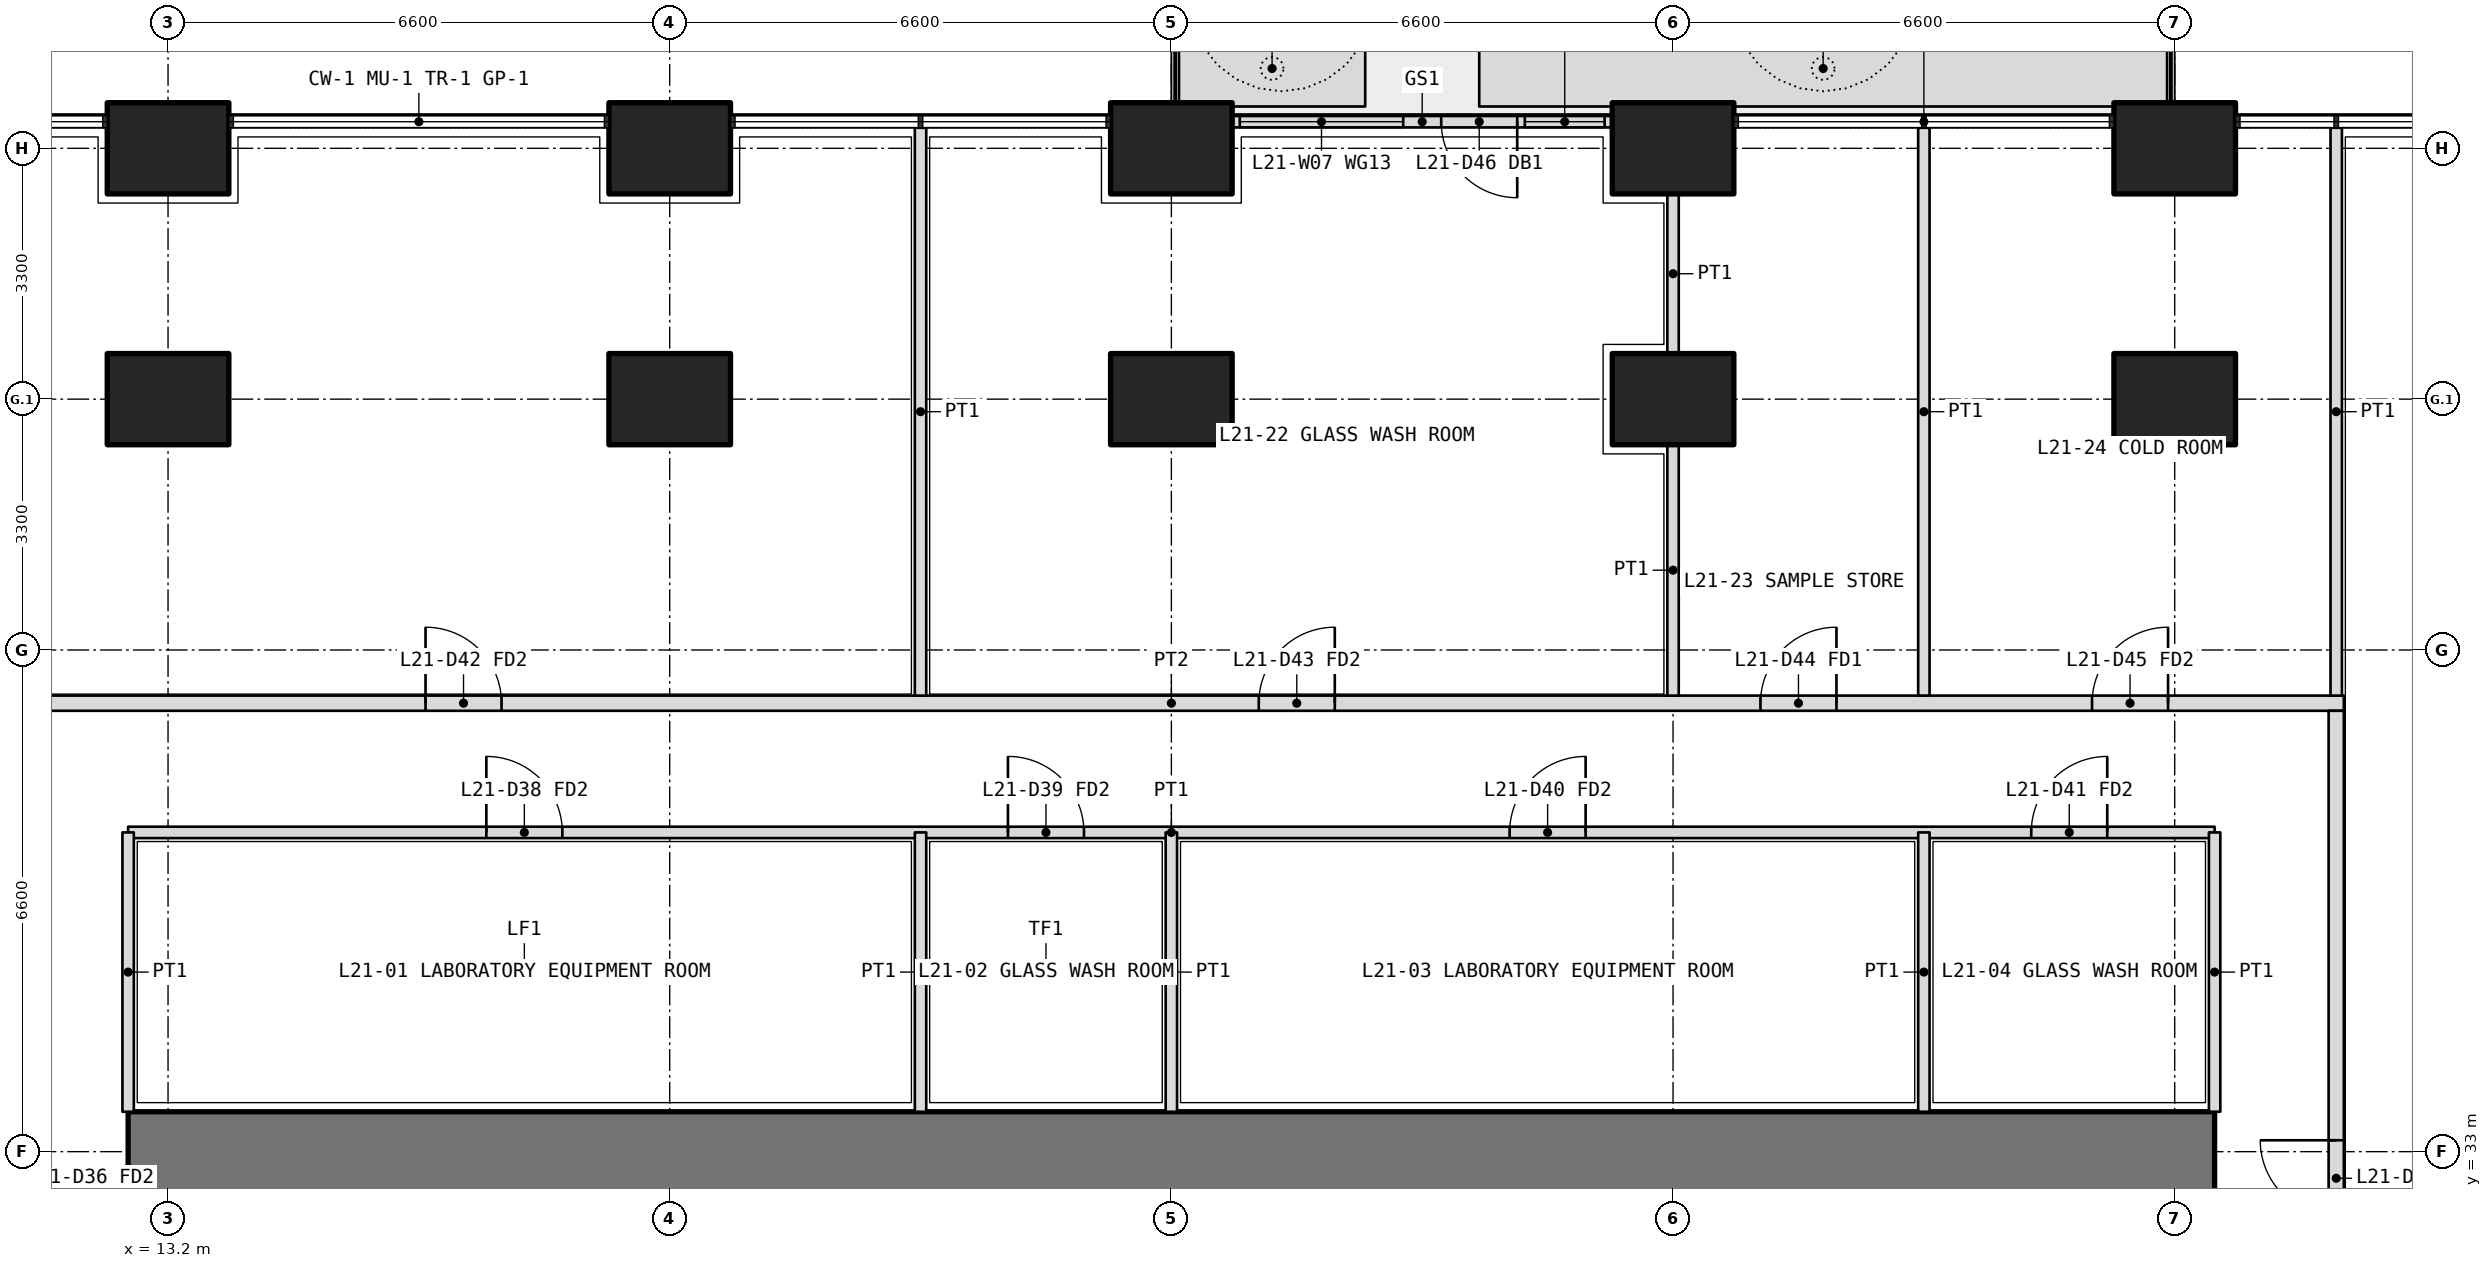
"""IFC4 building model, lengths in metres.
Left out: names, types, materials, properties, quantities, classifications, styles, units other than length and angle.
Written with IfcOpenShell. Run it as: python <this file> out.ifc"""

import sys

from ifc_helpers import new_model, si_unit, direction, frame, frame_2d, origin, origin_2d, place, context, subcontext, project, spatial, polyline, rectangle, outline, extrude, element, fill, save


model = new_model("IFC4")
c1 = context("Model", 3, precision=1e-05, world=origin(), true_north=direction((0.0, 1.0)))
c2 = subcontext(c1, "Body", "Model", "MODEL_VIEW")
j1 = project(units=[si_unit("LENGTHUNIT", "METRE"), si_unit("PLANEANGLEUNIT", "RADIAN")], contexts=[c1])
p1 = place(None, origin())
s1 = spatial("IfcSite", under=j1, at=p1, CompositionType="ELEMENT")
p2 = place(p1, origin())
s2 = spatial("IfcBuilding", under=s1, at=p2, CompositionType="ELEMENT")
p3 = place(p2, frame((0.0, 0.0, 94.8)))
s3 = spatial("IfcBuildingStorey", under=s2, at=p3, CompositionType="ELEMENT", Elevation=94.8)
for number, where, z_axis, x_axis in (
    (1, (13.2, 46.2, 0.0), (0.0, 0.0, 1.0), (1.0, 0.0, 0.0)),
    (2, (19.8, 46.2, 0.0), (0.0, 0.0, 1.0), (1.0, 0.0, 0.0)),
    (3, (26.4, 46.2, 0.0), (0.0, 0.0, 1.0), (1.0, 0.0, 0.0)),
    (4, (33.0, 46.2, 0.0), (0.0, 0.0, 1.0), (1.0, 0.0, 0.0)),
    (5, (39.6, 46.2, 0.0), (0.0, 0.0, 1.0), (1.0, 0.0, 0.0)),
    (6, (13.2, 42.9, 0.0), (0.0, 0.0, 1.0), (1.0, 0.0, 0.0)),
    (7, (19.8, 42.9, 0.0), (0.0, 0.0, 1.0), (1.0, 0.0, 0.0)),
    (8, (26.4, 42.9, 0.0), (0.0, 0.0, 1.0), (1.0, 0.0, 0.0)),
    (9, (33.0, 42.9, 0.0), (0.0, 0.0, 1.0), (1.0, 0.0, 0.0)),
    (10, (39.6, 42.9, 0.0), (0.0, 0.0, 1.0), (1.0, 0.0, 0.0)),
):
    element("IfcColumn", number, at=place(p3, frame(where, z_axis=z_axis, x_axis=x_axis)), inside=s3, PredefinedType="COLUMN", context=c2, shape_type="SweptSolid", body=[
        extrude(rectangle(XDim=1.6, YDim=1.2, at=origin_2d()), origin(), (0.0, 0.0, 1.0), 4.2),
    ])
p4 = place(p3, origin())
e11 = element("IfcWall", 11, at=p4, inside=s3, PredefinedType="USERDEFINED", context=c2, shape_type="SweptSolid", body=[
    extrude(outline(polyline([(26.5, 46.75), (28.95, 46.75), (28.95, 47.75), (26.5, 47.75), (26.5, 46.75)]), holes=[polyline([(26.65, 46.9), (28.8, 46.9), (28.8, 47.6), (26.65, 47.6), (26.65, 46.9)])]), origin(), (0.0, 0.0, 1.0), 1.05),
])
p5 = place(p3, origin())
e12 = element("IfcWall", 12, at=p5, inside=s3, PredefinedType="USERDEFINED", context=c2, shape_type="SweptSolid", body=[
    extrude(outline(polyline([(30.45, 46.75), (39.5, 46.75), (39.5, 47.75), (30.45, 47.75), (30.45, 46.75)]), holes=[polyline([(30.6, 46.9), (39.35, 46.9), (39.35, 47.6), (30.6, 47.6), (30.6, 46.9)])]), origin(), (0.0, 0.0, 1.0), 1.05),
])
p6 = place(p3, frame((32.2, 46.55, 0.0), z_axis=(0.0, 0.0, 1.0), x_axis=(-1.0, 0.0, 0.0)))
e13 = element("IfcWall", 13, at=p6, inside=s3, PredefinedType="SOLIDWALL", context=c2, shape_type="SweptSolid", body=[
    extrude(rectangle(XDim=5.0, YDim=0.15, at=frame_2d((2.5, 0.0))), origin(), (0.0, 0.0, 1.0), 2.7),
])
p7 = place(p6, frame((1.25, 0.0, 0.0)))
e14 = element("IfcOpeningElement", 14, at=p7, cuts=e13, PredefinedType="OPENING", context=c2, shape_type="SweptSolid", body=[
    extrude(rectangle(XDim=1.0, YDim=2.4, at=frame_2d((0.5, 1.2))), frame((0.0, 0.085, 0.0), z_axis=(0.0, -1.0, 0.0), x_axis=(1.0, 0.0, 0.0)), (0.0, 0.0, 1.0), 0.17),
])
p8 = place(p6, frame((0.1, 0.0, 0.1)))
e15 = element("IfcOpeningElement", 15, at=p8, cuts=e13, PredefinedType="OPENING", context=c2, shape_type="SweptSolid", body=[
    extrude(rectangle(XDim=1.05, YDim=2.3, at=frame_2d((0.525, 1.15))), frame((0.0, 0.085, 0.0), z_axis=(0.0, -1.0, 0.0), x_axis=(1.0, 0.0, 0.0)), (0.0, 0.0, 1.0), 0.17),
])
p9 = place(p6, frame((2.75, 0.0, 0.1)))
e16 = element("IfcOpeningElement", 16, at=p9, cuts=e13, PredefinedType="OPENING", context=c2, shape_type="SweptSolid", body=[
    extrude(rectangle(XDim=2.15, YDim=2.3, at=frame_2d((1.075, 1.15))), frame((0.0, 0.085, 0.0), z_axis=(0.0, -1.0, 0.0), x_axis=(1.0, 0.0, 0.0)), (0.0, 0.0, 1.0), 0.17),
])
p10 = place(p3, frame((40.125, 33.0, 0.0), z_axis=(0.0, 0.0, 1.0), x_axis=(-1.0, 0.0, 0.0)))
e17 = element("IfcWall", 17, at=p10, inside=s3, PredefinedType="SHEAR", context=c2, shape_type="SweptSolid", body=[
    extrude(rectangle(XDim=27.45, YDim=1.05, at=frame_2d((13.725, 0.0))), origin(), (0.0, 0.0, 1.0), 4.2),
])
p11 = place(p3, frame((12.675, 37.2, 0.0), z_axis=(0.0, 0.0, 1.0), x_axis=(1.0, 0.0, 0.0)))
e18 = element("IfcWall", 18, at=p11, inside=s3, PredefinedType="PARTITIONING", context=c2, shape_type="SweptSolid", body=[
    extrude(rectangle(XDim=27.45, YDim=0.15, at=frame_2d((13.725, 0.0))), origin(), (0.0, 0.0, 1.0), 2.85),
])
p12 = place(p11, frame((4.712, 0.0, 0.0)))
e19 = element("IfcOpeningElement", 19, at=p12, cuts=e18, PredefinedType="OPENING", context=c2, shape_type="SweptSolid", body=[
    extrude(rectangle(XDim=1.0, YDim=2.1, at=frame_2d((0.5, 1.05))), frame((0.0, 0.085, 0.0), z_axis=(0.0, -1.0, 0.0), x_axis=(1.0, 0.0, 0.0)), (0.0, 0.0, 1.0), 0.17),
])
p13 = place(p11, frame((11.575, 0.0, 0.0)))
e20 = element("IfcOpeningElement", 20, at=p13, cuts=e18, PredefinedType="OPENING", context=c2, shape_type="SweptSolid", body=[
    extrude(rectangle(XDim=1.0, YDim=2.1, at=frame_2d((0.5, 1.05))), frame((0.0, 0.085, 0.0), z_axis=(0.0, -1.0, 0.0), x_axis=(1.0, 0.0, 0.0)), (0.0, 0.0, 1.0), 0.17),
])
p14 = place(p11, frame((18.175, 0.0, 0.0)))
e21 = element("IfcOpeningElement", 21, at=p14, cuts=e18, PredefinedType="OPENING", context=c2, shape_type="SweptSolid", body=[
    extrude(rectangle(XDim=1.0, YDim=2.1, at=frame_2d((0.5, 1.05))), frame((0.0, 0.085, 0.0), z_axis=(0.0, -1.0, 0.0), x_axis=(1.0, 0.0, 0.0)), (0.0, 0.0, 1.0), 0.17),
])
p15 = place(p11, frame((25.038, 0.0, 0.0)))
e22 = element("IfcOpeningElement", 22, at=p15, cuts=e18, PredefinedType="OPENING", context=c2, shape_type="SweptSolid", body=[
    extrude(rectangle(XDim=1.0, YDim=2.1, at=frame_2d((0.5, 1.05))), frame((0.0, 0.085, 0.0), z_axis=(0.0, -1.0, 0.0), x_axis=(1.0, 0.0, 0.0)), (0.0, 0.0, 1.0), 0.17),
])
for number, where, z_axis, x_axis in (
    (23, (12.675, 33.525, 0.0), (0.0, 0.0, 1.0), (0.0, 1.0, 0.0)),
    (24, (40.125, 33.525, 0.0), (0.0, 0.0, 1.0), (0.0, 1.0, 0.0)),
):
    element("IfcWall", number, at=place(p3, frame(where, z_axis=z_axis, x_axis=x_axis)), inside=s3, PredefinedType="PARTITIONING", context=c2, shape_type="SweptSolid", body=[
        extrude(rectangle(XDim=3.675, YDim=0.15, at=frame_2d((1.837, 0.0))), origin(), (0.0, 0.0, 1.0), 2.85),
    ])
p16 = place(p3, frame((23.1, 33.525, 0.0), z_axis=(0.0, 0.0, 1.0), x_axis=(0.0, 1.0, 0.0)))
e25 = element("IfcWall", 25, at=p16, inside=s3, PredefinedType="PARTITIONING", context=c2, shape_type="SweptSolid", body=[
    extrude(rectangle(XDim=3.675, YDim=0.15, at=frame_2d((1.837, 0.0))), origin(), (0.0, 0.0, 1.0), 3.9),
])
p17 = place(p3, frame((26.4, 33.525, 0.0), z_axis=(0.0, 0.0, 1.0), x_axis=(0.0, 1.0, 0.0)))
e26 = element("IfcWall", 26, at=p17, inside=s3, PredefinedType="PARTITIONING", context=c2, shape_type="SweptSolid", body=[
    extrude(rectangle(XDim=3.675, YDim=0.15, at=frame_2d((1.837, 0.0))), origin(), (0.0, 0.0, 1.0), 2.85),
])
p18 = place(p3, frame((36.3, 33.525, 0.0), z_axis=(0.0, 0.0, 1.0), x_axis=(0.0, 1.0, 0.0)))
e27 = element("IfcWall", 27, at=p18, inside=s3, PredefinedType="PARTITIONING", context=c2, shape_type="SweptSolid", body=[
    extrude(rectangle(XDim=3.675, YDim=0.15, at=frame_2d((1.837, 0.0))), origin(), (0.0, 0.0, 1.0), 3.9),
])
p19 = place(p3, frame((10.975, 38.9, 0.0), z_axis=(0.0, 0.0, 1.0), x_axis=(1.0, 0.0, 0.0)))
e28 = element("IfcWall", 28, at=p19, inside=s3, PredefinedType="PARTITIONING", context=c2, shape_type="SweptSolid", body=[
    extrude(rectangle(XDim=30.85, YDim=0.2, at=frame_2d((15.425, 0.0))), origin(), (0.0, 0.0, 1.0), 2.85),
])
p20 = place(p19, frame((5.613, 0.0, 0.0)))
e29 = element("IfcOpeningElement", 29, at=p20, cuts=e28, PredefinedType="OPENING", context=c2, shape_type="SweptSolid", body=[
    extrude(rectangle(XDim=1.0, YDim=2.1, at=frame_2d((0.5, 1.05))), frame((0.0, 0.11, 0.0), z_axis=(0.0, -1.0, 0.0), x_axis=(1.0, 0.0, 0.0)), (0.0, 0.0, 1.0), 0.22),
])
p21 = place(p19, frame((16.575, 0.0, 0.0)))
e30 = element("IfcOpeningElement", 30, at=p21, cuts=e28, PredefinedType="OPENING", context=c2, shape_type="SweptSolid", body=[
    extrude(rectangle(XDim=1.0, YDim=2.1, at=frame_2d((0.5, 1.05))), frame((0.0, 0.11, 0.0), z_axis=(0.0, -1.0, 0.0), x_axis=(1.0, 0.0, 0.0)), (0.0, 0.0, 1.0), 0.22),
])
p22 = place(p19, frame((23.175, 0.0, 0.0)))
e31 = element("IfcOpeningElement", 31, at=p22, cuts=e28, PredefinedType="OPENING", context=c2, shape_type="SweptSolid", body=[
    extrude(rectangle(XDim=1.0, YDim=2.1, at=frame_2d((0.5, 1.05))), frame((0.0, 0.11, 0.0), z_axis=(0.0, -1.0, 0.0), x_axis=(1.0, 0.0, 0.0)), (0.0, 0.0, 1.0), 0.22),
])
p23 = place(p19, frame((27.538, 0.0, 0.0)))
e32 = element("IfcOpeningElement", 32, at=p23, cuts=e28, PredefinedType="OPENING", context=c2, shape_type="SweptSolid", body=[
    extrude(rectangle(XDim=1.0, YDim=2.1, at=frame_2d((0.5, 1.05))), frame((0.0, 0.11, 0.0), z_axis=(0.0, -1.0, 0.0), x_axis=(1.0, 0.0, 0.0)), (0.0, 0.0, 1.0), 0.22),
])
p24 = place(p3, frame((41.725, 19.8, 0.0), z_axis=(0.0, 0.0, 1.0), x_axis=(0.0, 1.0, 0.0)))
e33 = element("IfcWall", 33, at=p24, inside=s3, PredefinedType="PARTITIONING", context=c2, shape_type="SweptSolid", body=[
    extrude(rectangle(XDim=19.0, YDim=0.2, at=frame_2d((9.5, 0.0))), origin(), (0.0, 0.0, 1.0), 2.85),
])
p25 = place(p24, frame((1.1, 0.0, 0.0)))
e34 = element("IfcOpeningElement", 34, at=p25, cuts=e33, PredefinedType="OPENING", context=c2, shape_type="SweptSolid", body=[
    extrude(rectangle(XDim=1.0, YDim=2.1, at=frame_2d((0.5, 1.05))), frame((0.0, 0.11, 0.0), z_axis=(0.0, -1.0, 0.0), x_axis=(1.0, 0.0, 0.0)), (0.0, 0.0, 1.0), 0.22),
])
p26 = place(p24, frame((4.45, 0.0, 0.0)))
e35 = element("IfcOpeningElement", 35, at=p26, cuts=e33, PredefinedType="OPENING", context=c2, shape_type="SweptSolid", body=[
    extrude(rectangle(XDim=0.9, YDim=2.1, at=frame_2d((0.45, 1.05))), frame((0.0, 0.11, 0.0), z_axis=(0.0, -1.0, 0.0), x_axis=(1.0, 0.0, 0.0)), (0.0, 0.0, 1.0), 0.22),
])
p27 = place(p24, frame((12.35, 0.0, 0.0)))
e36 = element("IfcOpeningElement", 36, at=p27, cuts=e33, PredefinedType="OPENING", context=c2, shape_type="SweptSolid", body=[
    extrude(rectangle(XDim=1.0, YDim=2.1, at=frame_2d((0.5, 1.05))), frame((0.0, 0.11, 0.0), z_axis=(0.0, -1.0, 0.0), x_axis=(1.0, 0.0, 0.0)), (0.0, 0.0, 1.0), 0.22),
])
for number, where, z_axis, x_axis in (
    (37, (41.725, 46.47, 0.0), (0.0, 0.0, 1.0), (0.0, -1.0, 0.0)),
    (38, (23.1, 46.47, 0.0), (0.0, 0.0, 1.0), (0.0, -1.0, 0.0)),
):
    element("IfcWall", number, at=place(p3, frame(where, z_axis=z_axis, x_axis=x_axis)), inside=s3, PredefinedType="PARTITIONING", context=c2, shape_type="SweptSolid", body=[
        extrude(rectangle(XDim=7.47, YDim=0.15, at=frame_2d((3.735, 0.0))), origin(), (0.0, 0.0, 1.0), 2.7),
    ])
p28 = place(p3, frame((33.0, 45.6, 0.0), z_axis=(0.0, 0.0, 1.0), x_axis=(0.0, -1.0, 0.0)))
e39 = element("IfcWall", 39, at=p28, inside=s3, PredefinedType="PARTITIONING", context=c2, shape_type="SweptSolid", body=[
    extrude(rectangle(XDim=2.1, YDim=0.15, at=frame_2d((1.05, 0.0))), origin(), (0.0, 0.0, 1.0), 2.85),
])
p29 = place(p3, frame((33.0, 42.3, 0.0), z_axis=(0.0, 0.0, 1.0), x_axis=(0.0, -1.0, 0.0)))
e40 = element("IfcWall", 40, at=p29, inside=s3, PredefinedType="PARTITIONING", context=c2, shape_type="SweptSolid", body=[
    extrude(rectangle(XDim=3.3, YDim=0.15, at=frame_2d((1.65, 0.0))), origin(), (0.0, 0.0, 1.0), 2.85),
])
p30 = place(p3, frame((36.3, 46.47, 0.0), z_axis=(0.0, 0.0, 1.0), x_axis=(0.0, -1.0, 0.0)))
e41 = element("IfcWall", 41, at=p30, inside=s3, PredefinedType="PARTITIONING", context=c2, shape_type="SweptSolid", body=[
    extrude(rectangle(XDim=7.47, YDim=0.15, at=frame_2d((3.735, 0.0))), origin(), (0.0, 0.0, 1.0), 2.7),
])
p31 = place(p7, origin())
e42 = element("IfcDoor", 42, at=p31, inside=s3, OperationType="SINGLE_SWING_LEFT", PredefinedType="DOOR", context=c2, shape_type="SweptSolid", body=[
    extrude(rectangle(XDim=1.0, YDim=2.4, at=frame_2d((0.5, 1.2))), frame((0.0, 0.025, 0.0), z_axis=(0.0, -1.0, 0.0), x_axis=(1.0, 0.0, 0.0)), (0.0, 0.0, 1.0), 0.05),
])
fill(e14, e42)
p32 = place(p8, origin())
e43 = element("IfcWindow", 43, at=p32, inside=s3, PartitioningType="SINGLE_PANEL", PredefinedType="WINDOW", context=c2, shape_type="SweptSolid", body=[
    extrude(rectangle(XDim=1.05, YDim=2.3, at=frame_2d((0.525, 1.15))), frame((0.0, 0.03, 0.0), z_axis=(0.0, -1.0, 0.0), x_axis=(1.0, 0.0, 0.0)), (0.0, 0.0, 1.0), 0.06),
])
fill(e15, e43)
p33 = place(p9, origin())
e44 = element("IfcWindow", 44, at=p33, inside=s3, PartitioningType="SINGLE_PANEL", PredefinedType="WINDOW", context=c2, shape_type="SweptSolid", body=[
    extrude(rectangle(XDim=2.15, YDim=2.3, at=frame_2d((1.075, 1.15))), frame((0.0, 0.03, 0.0), z_axis=(0.0, -1.0, 0.0), x_axis=(1.0, 0.0, 0.0)), (0.0, 0.0, 1.0), 0.06),
])
fill(e16, e44)
p34 = place(p12, origin())
e45 = element("IfcDoor", 45, at=p34, inside=s3, OperationType="SINGLE_SWING_LEFT", PredefinedType="DOOR", context=c2, shape_type="SweptSolid", body=[
    extrude(rectangle(XDim=1.0, YDim=2.1, at=frame_2d((0.5, 1.05))), frame((0.0, 0.025, 0.0), z_axis=(0.0, -1.0, 0.0), x_axis=(1.0, 0.0, 0.0)), (0.0, 0.0, 1.0), 0.05),
])
fill(e19, e45)
p35 = place(p13, origin())
e46 = element("IfcDoor", 46, at=p35, inside=s3, OperationType="SINGLE_SWING_LEFT", PredefinedType="DOOR", context=c2, shape_type="SweptSolid", body=[
    extrude(rectangle(XDim=1.0, YDim=2.1, at=frame_2d((0.5, 1.05))), frame((0.0, 0.025, 0.0), z_axis=(0.0, -1.0, 0.0), x_axis=(1.0, 0.0, 0.0)), (0.0, 0.0, 1.0), 0.05),
])
fill(e20, e46)
p36 = place(p14, origin())
e47 = element("IfcDoor", 47, at=p36, inside=s3, OperationType="SINGLE_SWING_RIGHT", PredefinedType="DOOR", context=c2, shape_type="SweptSolid", body=[
    extrude(rectangle(XDim=1.0, YDim=2.1, at=frame_2d((0.5, 1.05))), frame((0.0, 0.025, 0.0), z_axis=(0.0, -1.0, 0.0), x_axis=(1.0, 0.0, 0.0)), (0.0, 0.0, 1.0), 0.05),
])
fill(e21, e47)
p37 = place(p15, origin())
e48 = element("IfcDoor", 48, at=p37, inside=s3, OperationType="SINGLE_SWING_RIGHT", PredefinedType="DOOR", context=c2, shape_type="SweptSolid", body=[
    extrude(rectangle(XDim=1.0, YDim=2.1, at=frame_2d((0.5, 1.05))), frame((0.0, 0.025, 0.0), z_axis=(0.0, -1.0, 0.0), x_axis=(1.0, 0.0, 0.0)), (0.0, 0.0, 1.0), 0.05),
])
fill(e22, e48)
p38 = place(p27, origin())
e49 = element("IfcDoor", 49, at=p38, inside=s3, OperationType="SINGLE_SWING_RIGHT", PredefinedType="DOOR", context=c2, shape_type="SweptSolid", body=[
    extrude(rectangle(XDim=1.0, YDim=2.1, at=frame_2d((0.5, 1.05))), frame((0.0, 0.025, 0.0), z_axis=(0.0, -1.0, 0.0), x_axis=(1.0, 0.0, 0.0)), (0.0, 0.0, 1.0), 0.05),
])
fill(e36, e49)
p39 = place(p20, origin())
e50 = element("IfcDoor", 50, at=p39, inside=s3, OperationType="SINGLE_SWING_LEFT", PredefinedType="DOOR", context=c2, shape_type="SweptSolid", body=[
    extrude(rectangle(XDim=1.0, YDim=2.1, at=frame_2d((0.5, 1.05))), frame((0.0, 0.025, 0.0), z_axis=(0.0, -1.0, 0.0), x_axis=(1.0, 0.0, 0.0)), (0.0, 0.0, 1.0), 0.05),
])
fill(e29, e50)
p40 = place(p21, origin())
e51 = element("IfcDoor", 51, at=p40, inside=s3, OperationType="SINGLE_SWING_RIGHT", PredefinedType="DOOR", context=c2, shape_type="SweptSolid", body=[
    extrude(rectangle(XDim=1.0, YDim=2.1, at=frame_2d((0.5, 1.05))), frame((0.0, 0.025, 0.0), z_axis=(0.0, -1.0, 0.0), x_axis=(1.0, 0.0, 0.0)), (0.0, 0.0, 1.0), 0.05),
])
fill(e30, e51)
p41 = place(p22, origin())
e52 = element("IfcDoor", 52, at=p41, inside=s3, OperationType="SINGLE_SWING_RIGHT", PredefinedType="DOOR", context=c2, shape_type="SweptSolid", body=[
    extrude(rectangle(XDim=1.0, YDim=2.1, at=frame_2d((0.5, 1.05))), frame((0.0, 0.025, 0.0), z_axis=(0.0, -1.0, 0.0), x_axis=(1.0, 0.0, 0.0)), (0.0, 0.0, 1.0), 0.05),
])
fill(e31, e52)
p42 = place(p23, origin())
e53 = element("IfcDoor", 53, at=p42, inside=s3, OperationType="SINGLE_SWING_RIGHT", PredefinedType="DOOR", context=c2, shape_type="SweptSolid", body=[
    extrude(rectangle(XDim=1.0, YDim=2.1, at=frame_2d((0.5, 1.05))), frame((0.0, 0.025, 0.0), z_axis=(0.0, -1.0, 0.0), x_axis=(1.0, 0.0, 0.0)), (0.0, 0.0, 1.0), 0.05),
])
fill(e32, e53)
save(model, sys.argv[1])
